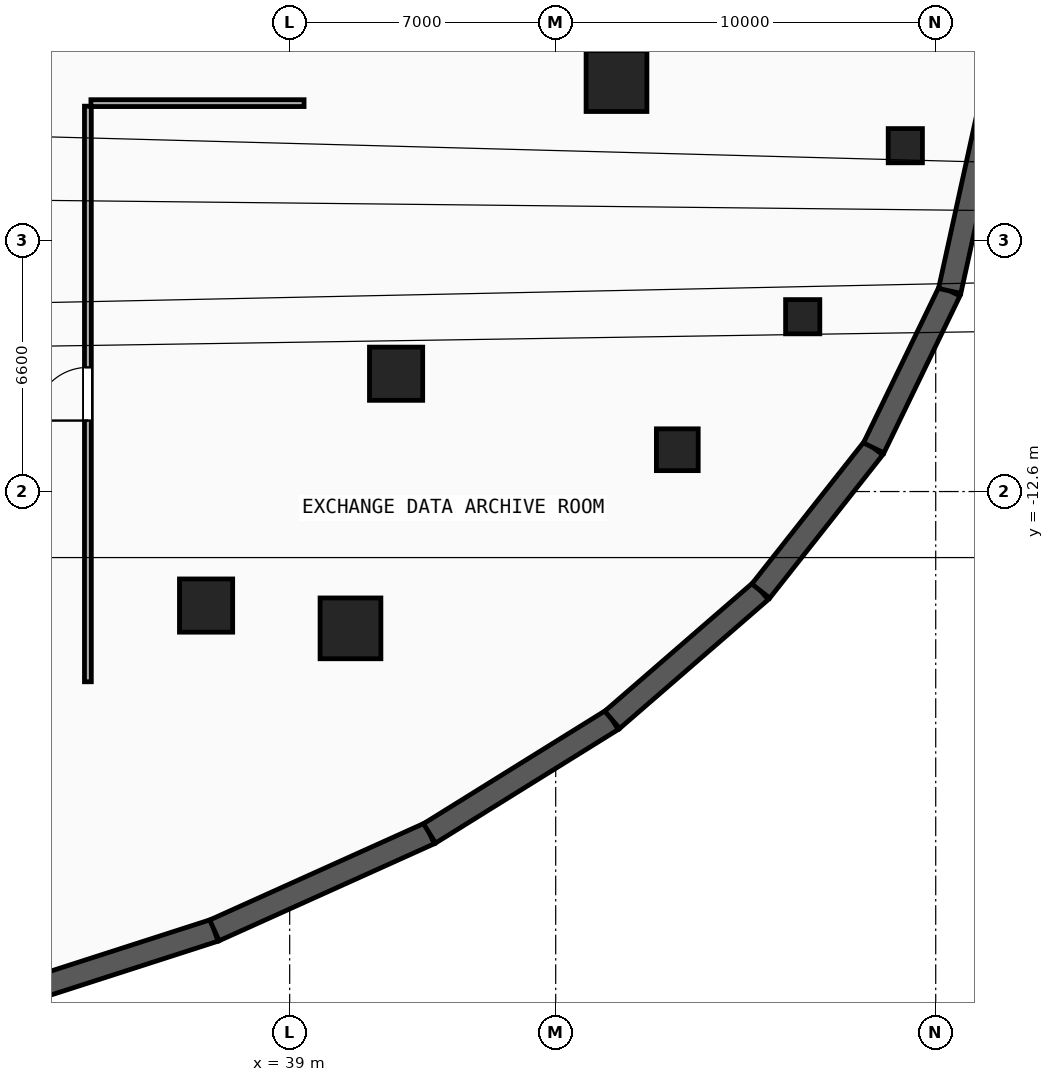
"""IFC4 building model, lengths in metres.
Left out: names, types, materials, properties, quantities, classifications, styles, units other than length and angle.
Written with IfcOpenShell. Run it as: python <this file> out.ifc"""

import sys

from ifc_helpers import new_model, si_unit, direction, frame, frame_2d, origin, origin_2d, place, context, subcontext, project, spatial, rectangle, circle, extrude, element, fill, save


model = new_model("IFC4")
c1 = context("Model", 3, precision=1e-05, world=origin(), true_north=direction((0.0, 1.0)))
c2 = subcontext(c1, "Body", "Model", "MODEL_VIEW")
j1 = project(units=[si_unit("LENGTHUNIT", "METRE"), si_unit("PLANEANGLEUNIT", "RADIAN")], contexts=[c1])
p1 = place(None, origin())
s1 = spatial("IfcSite", under=j1, at=p1, CompositionType="ELEMENT")
p2 = place(p1, origin())
s2 = spatial("IfcBuilding", under=s1, at=p2, CompositionType="ELEMENT")
p3 = place(p2, frame((0.0, 0.0, -4.5)))
s3 = spatial("IfcBuildingStorey", under=s2, at=p3, CompositionType="ELEMENT", Elevation=-4.5)
for number, where, z_axis, x_axis in (
    (1, (41.8, -9.5, 0.0), (0.0, 0.0, 1.0), (1.0, 0.0, 0.0)),
    (2, (36.8, -15.6, 0.0), (0.0, 0.0, 1.0), (1.0, 0.0, 0.0)),
):
    element("IfcColumn", number, at=place(p3, frame(where, z_axis=z_axis, x_axis=x_axis)), inside=s3, PredefinedType="COLUMN", context=c2, shape_type="SweptSolid", body=[
        extrude(rectangle(XDim=1.4, YDim=1.4, at=origin_2d()), origin(), (0.0, 0.0, 1.0), 4.5),
    ])
for number, where, z_axis, x_axis in (
    (3, (40.6, -16.2, 0.0), (0.0, 0.0, 1.0), (1.0, 0.0, 0.0)),
    (4, (47.6, -1.8, 0.0), (0.0, 0.0, 1.0), (1.0, 0.0, 0.0)),
):
    element("IfcColumn", number, at=place(p3, frame(where, z_axis=z_axis, x_axis=x_axis)), inside=s3, PredefinedType="COLUMN", context=c2, shape_type="SweptSolid", body=[
        extrude(rectangle(XDim=1.6, YDim=1.6, at=origin_2d()), origin(), (0.0, 0.0, 1.0), 4.5),
    ])
p4 = place(p3, frame((49.2, -11.5, 0.0), z_axis=(0.0, 0.0, 1.0), x_axis=(1.0, 0.0, 0.0)))
e5 = element("IfcColumn", 5, at=p4, inside=s3, PredefinedType="PILASTER", context=c2, shape_type="SweptSolid", body=[
    extrude(circle(Radius=0.55, at=origin_2d()), origin(), (0.0, 0.0, 1.0), 4.5),
])
for number, where, z_axis, x_axis in (
    (6, (52.5, -8.0, 0.0), (0.0, 0.0, 1.0), (1.0, 0.0, 0.0)),
    (7, (55.2, -3.5, 0.0), (0.0, 0.0, 1.0), (1.0, 0.0, 0.0)),
):
    element("IfcColumn", number, at=place(p3, frame(where, z_axis=z_axis, x_axis=x_axis)), inside=s3, PredefinedType="COLUMN", context=c2, shape_type="SweptSolid", body=[
        extrude(rectangle(XDim=0.9, YDim=0.9, at=origin_2d()), origin(), (0.0, 0.0, 1.0), 4.5),
    ])
p5 = place(p3, frame((30.546, -26.232, 0.0), z_axis=(0.0, 0.0, 1.0), x_axis=(0.951843868052, 0.306583187492, 0.0)))
e8 = element("IfcWall", 8, at=p5, inside=s3, PredefinedType="USERDEFINED", context=c2, shape_type="SweptSolid", body=[
    extrude(rectangle(XDim=6.801, YDim=0.6, at=frame_2d((3.4, 0.0))), origin(), (0.0, 0.0, 1.0), 4.15),
])
p6 = place(p3, frame((37.019, -24.147, 0.0), z_axis=(0.0, 0.0, 1.0), x_axis=(0.911643952457, 0.410980904603, 0.0)))
e9 = element("IfcWall", 9, at=p6, inside=s3, PredefinedType="USERDEFINED", context=c2, shape_type="SweptSolid", body=[
    extrude(rectangle(XDim=6.209, YDim=0.6, at=frame_2d((3.105, 0.0))), origin(), (0.0, 0.0, 1.0), 4.15),
])
p7 = place(p3, frame((42.68, -21.595, 0.0), z_axis=(0.0, 0.0, 1.0), x_axis=(0.849299437699, 0.527911417877, 0.0)))
e10 = element("IfcWall", 10, at=p7, inside=s3, PredefinedType="USERDEFINED", context=c2, shape_type="SweptSolid", body=[
    extrude(rectangle(XDim=5.66, YDim=0.6, at=frame_2d((2.83, 0.0))), origin(), (0.0, 0.0, 1.0), 4.15),
])
p8 = place(p3, frame((47.487, -18.607, 0.0), z_axis=(0.0, 0.0, 1.0), x_axis=(0.755564536906, 0.655074217605, 0.0)))
e11 = element("IfcWall", 11, at=p8, inside=s3, PredefinedType="USERDEFINED", context=c2, shape_type="SweptSolid", body=[
    extrude(rectangle(XDim=5.175, YDim=0.6, at=frame_2d((2.587, 0.0))), origin(), (0.0, 0.0, 1.0), 4.15),
])
p9 = place(p3, frame((51.397, -15.217, 0.0), z_axis=(0.0, 0.0, 1.0), x_axis=(0.619447864054, 0.785037797637, 0.0)))
e12 = element("IfcWall", 12, at=p9, inside=s3, PredefinedType="USERDEFINED", context=c2, shape_type="SweptSolid", body=[
    extrude(rectangle(XDim=4.796, YDim=0.6, at=frame_2d((2.398, 0.0))), origin(), (0.0, 0.0, 1.0), 4.15),
])
p10 = place(p3, frame((54.368, -11.452, 0.0), z_axis=(0.0, 0.0, 1.0), x_axis=(0.435772260249, 0.900056963307, 0.0)))
e13 = element("IfcWall", 13, at=p10, inside=s3, PredefinedType="USERDEFINED", context=c2, shape_type="SweptSolid", body=[
    extrude(rectangle(XDim=4.59, YDim=0.6, at=frame_2d((2.295, 0.0))), origin(), (0.0, 0.0, 1.0), 4.15),
])
p11 = place(p3, frame((56.368, -7.321, 0.0), z_axis=(0.0, 0.0, 1.0), x_axis=(0.214510247434, 0.976721738135, 0.0)))
e14 = element("IfcWall", 14, at=p11, inside=s3, PredefinedType="USERDEFINED", context=c2, shape_type="SweptSolid", body=[
    extrude(rectangle(XDim=4.69, YDim=0.6, at=frame_2d((2.345, 0.0))), origin(), (0.0, 0.0, 1.0), 4.15),
])
p12 = place(p3, frame((33.69, -17.605, 0.0), z_axis=(0.0, 0.0, 1.0), x_axis=(0.0, 1.0, 0.0)))
e15 = element("IfcWall", 15, at=p12, inside=s3, PredefinedType="PARTITIONING", context=c2, shape_type="SweptSolid", body=[
    extrude(rectangle(XDim=15.145, YDim=0.18, at=frame_2d((7.573, 0.0))), origin(), (0.0, 0.0, 1.0), 4.15),
])
p13 = place(p12, frame((6.873, 0.0, 0.0)))
e16 = element("IfcOpeningElement", 16, at=p13, cuts=e15, PredefinedType="OPENING", context=c2, shape_type="SweptSolid", body=[
    extrude(rectangle(XDim=1.4, YDim=2.2, at=frame_2d((0.7, 1.1))), frame((0.0, 0.1, 0.0), z_axis=(0.0, -1.0, 0.0), x_axis=(1.0, 0.0, 0.0)), (0.0, 0.0, 1.0), 0.2),
])
p14 = place(p3, frame((33.77, -2.38, 0.0), z_axis=(0.0, 0.0, 1.0), x_axis=(1.0, 0.0, 0.0)))
e17 = element("IfcWall", 17, at=p14, inside=s3, PredefinedType="PARTITIONING", context=c2, shape_type="SweptSolid", body=[
    extrude(rectangle(XDim=5.608, YDim=0.18, at=frame_2d((2.804, 0.0))), origin(), (0.0, 0.0, 1.0), 4.15),
])
p15 = place(p13, origin())
e18 = element("IfcDoor", 18, at=p15, inside=s3, OperationType="SINGLE_SWING_LEFT", PredefinedType="DOOR", context=c2, shape_type="SweptSolid", body=[
    extrude(rectangle(XDim=1.4, YDim=2.2, at=frame_2d((0.7, 1.1))), frame((0.0, 0.025, 0.0), z_axis=(0.0, -1.0, 0.0), x_axis=(1.0, 0.0, 0.0)), (0.0, 0.0, 1.0), 0.05),
])
fill(e16, e18)
save(model, sys.argv[1])
